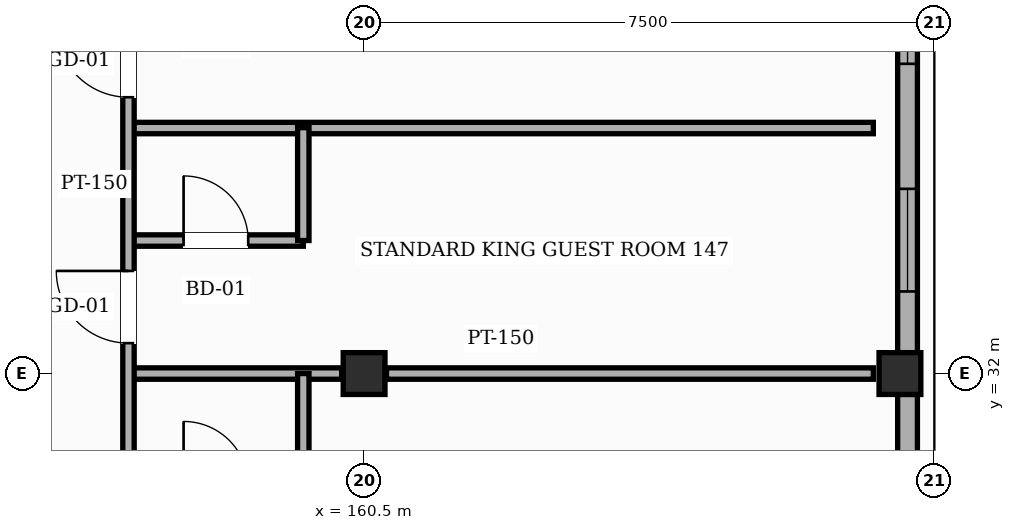
"""IFC4 building model, lengths in metres.
Left out: names, types, materials, properties, quantities, classifications, styles, units other than length and angle.
Written with IfcOpenShell. Run it as: python <this file> out.ifc"""

import sys

from ifc_helpers import new_model, si_unit, direction, frame, frame_2d, origin, origin_2d, place, context, subcontext, project, spatial, rectangle, hollow_rectangle, extrude, element, fill, save


model = new_model("IFC4")
c1 = context("Model", 3, precision=1e-05, world=origin(), true_north=direction((0.0, 1.0)))
c2 = subcontext(c1, "Body", "Model", "MODEL_VIEW")
j1 = project(units=[si_unit("LENGTHUNIT", "METRE"), si_unit("PLANEANGLEUNIT", "RADIAN")], contexts=[c1])
p1 = place(None, origin())
s1 = spatial("IfcSite", under=j1, at=p1, CompositionType="ELEMENT")
p2 = place(p1, origin())
s2 = spatial("IfcBuilding", under=s1, at=p2, CompositionType="ELEMENT")
p3 = place(p2, frame((0.0, 0.0, 28.2)))
s3 = spatial("IfcBuildingStorey", under=s2, at=p3, CompositionType="ELEMENT", Elevation=28.2)
for number, where, z_axis, x_axis in (
    (1, (160.5, 32.0, 0.0), (0.0, 0.0, 1.0), (1.0, 0.0, 0.0)),
    (2, (167.55, 32.0, 0.0), (0.0, 0.0, 1.0), (1.0, 0.0, 0.0)),
):
    element("IfcColumn", number, at=place(p3, frame(where, z_axis=z_axis, x_axis=x_axis)), inside=s3, PredefinedType="COLUMN", context=c2, shape_type="SweptSolid", body=[
        extrude(hollow_rectangle(XDim=0.55, YDim=0.55, WallThickness=0.022, InnerFilletRadius=0.022, OuterFilletRadius=0.044, at=origin_2d()), origin(), (0.0, 0.0, 1.0), 3.6),
    ])
p4 = place(p3, frame((167.65, 31.725, 0.0), z_axis=(0.0, 0.0, 1.0), x_axis=(0.0, -1.0, 0.0)))
e3 = element("IfcWall", 3, at=p4, inside=s3, PredefinedType="SOLIDWALL", context=c2, shape_type="SweptSolid", body=[
    extrude(rectangle(XDim=7.45, YDim=0.26, at=frame_2d((3.725, 0.0))), origin(), (0.0, 0.0, 1.0), 2.755),
])
p5 = place(p4, frame((3.525, 0.0, 0.85)))
e4 = element("IfcOpeningElement", 4, at=p5, cuts=e3, PredefinedType="OPENING", context=c2, shape_type="SweptSolid", body=[
    extrude(rectangle(XDim=2.1, YDim=1.35, at=frame_2d((1.05, 0.675))), frame((0.0, 0.14, 0.0), z_axis=(0.0, -1.0, 0.0), x_axis=(1.0, 0.0, 0.0)), (0.0, 0.0, 1.0), 0.28),
])
p6 = place(p4, frame((0.905, 0.0, 0.85)))
e5 = element("IfcOpeningElement", 5, at=p6, cuts=e3, PredefinedType="OPENING", context=c2, shape_type="SweptSolid", body=[
    extrude(rectangle(XDim=1.15, YDim=1.5, at=frame_2d((0.575, 0.75))), frame((0.0, 0.14, 0.0), z_axis=(0.0, -1.0, 0.0), x_axis=(1.0, 0.0, 0.0)), (0.0, 0.0, 1.0), 0.28),
])
p7 = place(p3, frame((167.65, 40.625, 0.0), z_axis=(0.0, 0.0, 1.0), x_axis=(0.0, -1.0, 0.0)))
e6 = element("IfcWall", 6, at=p7, inside=s3, PredefinedType="SOLIDWALL", context=c2, shape_type="SweptSolid", body=[
    extrude(rectangle(XDim=8.35, YDim=0.26, at=frame_2d((4.175, 0.0))), origin(), (0.0, 0.0, 1.0), 2.755),
])
p8 = place(p7, frame((6.195, 0.0, 0.85)))
e7 = element("IfcOpeningElement", 7, at=p8, cuts=e6, PredefinedType="OPENING", context=c2, shape_type="SweptSolid", body=[
    extrude(rectangle(XDim=1.35, YDim=1.5, at=frame_2d((0.675, 0.75))), frame((0.0, 0.14, 0.0), z_axis=(0.0, -1.0, 0.0), x_axis=(1.0, 0.0, 0.0)), (0.0, 0.0, 1.0), 0.28),
])
p9 = place(p7, frame((3.0, 0.0, 0.85)))
e8 = element("IfcOpeningElement", 8, at=p9, cuts=e6, PredefinedType="OPENING", context=c2, shape_type="SweptSolid", body=[
    extrude(rectangle(XDim=1.55, YDim=1.5, at=frame_2d((0.775, 0.75))), frame((0.0, 0.14, 0.0), z_axis=(0.0, -1.0, 0.0), x_axis=(1.0, 0.0, 0.0)), (0.0, 0.0, 1.0), 0.28),
])
p10 = place(p7, frame((0.205, 0.0, 0.85)))
e9 = element("IfcOpeningElement", 9, at=p10, cuts=e6, PredefinedType="OPENING", context=c2, shape_type="SweptSolid", body=[
    extrude(rectangle(XDim=1.75, YDim=1.5, at=frame_2d((0.875, 0.75))), frame((0.0, 0.14, 0.0), z_axis=(0.0, -1.0, 0.0), x_axis=(1.0, 0.0, 0.0)), (0.0, 0.0, 1.0), 0.28),
])
p11 = place(p3, frame((157.4, 32.0, 0.0), z_axis=(0.0, 0.0, 1.0), x_axis=(1.0, 0.0, 0.0)))
e10 = element("IfcWall", 10, at=p11, inside=s3, PredefinedType="PARTITIONING", context=c2, shape_type="SweptSolid", body=[
    extrude(rectangle(XDim=2.805, YDim=0.15, at=frame_2d((1.403, 0.0))), origin(), (0.0, 0.0, 1.0), 2.805),
])
p12 = place(p3, frame((160.795, 32.0, 0.0), z_axis=(0.0, 0.0, 1.0), x_axis=(1.0, 0.0, 0.0)))
e11 = element("IfcWall", 11, at=p12, inside=s3, PredefinedType="PARTITIONING", context=c2, shape_type="SweptSolid", body=[
    extrude(rectangle(XDim=6.405, YDim=0.15, at=frame_2d((3.203, 0.0))), origin(), (0.0, 0.0, 1.0), 2.855),
])
p13 = place(p3, frame((157.4, 33.75, 0.0), z_axis=(0.0, 0.0, 1.0), x_axis=(1.0, 0.0, 0.0)))
e12 = element("IfcWall", 12, at=p13, inside=s3, PredefinedType="PARTITIONING", context=c2, shape_type="SweptSolid", body=[
    extrude(rectangle(XDim=2.3, YDim=0.15, at=frame_2d((1.15, 0.0))), origin(), (0.0, 0.0, 1.0), 3.365),
])
p14 = place(p13, frame((0.725, 0.0, 0.0)))
e13 = element("IfcOpeningElement", 13, at=p14, cuts=e12, PredefinedType="OPENING", context=c2, shape_type="SweptSolid", body=[
    extrude(rectangle(XDim=0.85, YDim=2.1, at=frame_2d((0.425, 1.05))), frame((0.0, 0.085, 0.0), z_axis=(0.0, -1.0, 0.0), x_axis=(1.0, 0.0, 0.0)), (0.0, 0.0, 1.0), 0.17),
])
p15 = place(p3, frame((157.4, 35.23, 0.0), z_axis=(0.0, 0.0, 1.0), x_axis=(1.0, 0.0, 0.0)))
e14 = element("IfcWall", 14, at=p15, inside=s3, PredefinedType="PARTITIONING", context=c2, shape_type="SweptSolid", body=[
    extrude(rectangle(XDim=9.8, YDim=0.15, at=frame_2d((4.9, 0.0))), origin(), (0.0, 0.0, 1.0), 3.365),
])
p16 = place(p3, frame((157.4, 22.3, 0.0), z_axis=(0.0, 0.0, 1.0), x_axis=(0.0, 1.0, 0.0)))
e15 = element("IfcWall", 15, at=p16, inside=s3, PredefinedType="PARTITIONING", context=c2, shape_type="SweptSolid", body=[
    extrude(rectangle(XDim=48.5, YDim=0.15, at=frame_2d((24.25, 0.0))), origin(), (0.0, 0.0, 1.0), 3.365),
])
p17 = place(p16, frame((0.325, 0.0, 0.0)))
e16 = element("IfcOpeningElement", 16, at=p17, cuts=e15, PredefinedType="OPENING", context=c2, shape_type="SweptSolid", body=[
    extrude(rectangle(XDim=1.1, YDim=2.2, at=frame_2d((0.55, 1.1))), frame((0.0, 0.085, 0.0), z_axis=(0.0, -1.0, 0.0), x_axis=(1.0, 0.0, 0.0)), (0.0, 0.0, 1.0), 0.17),
])
p18 = place(p16, frame((3.635, 0.0, 0.0)))
e17 = element("IfcOpeningElement", 17, at=p18, cuts=e15, PredefinedType="OPENING", context=c2, shape_type="SweptSolid", body=[
    extrude(rectangle(XDim=0.95, YDim=2.15, at=frame_2d((0.475, 1.075))), frame((0.0, 0.085, 0.0), z_axis=(0.0, -1.0, 0.0), x_axis=(1.0, 0.0, 0.0)), (0.0, 0.0, 1.0), 0.17),
])
p19 = place(p16, frame((6.865, 0.0, 0.0)))
e18 = element("IfcOpeningElement", 18, at=p19, cuts=e15, PredefinedType="OPENING", context=c2, shape_type="SweptSolid", body=[
    extrude(rectangle(XDim=0.95, YDim=2.15, at=frame_2d((0.475, 1.075))), frame((0.0, 0.085, 0.0), z_axis=(0.0, -1.0, 0.0), x_axis=(1.0, 0.0, 0.0)), (0.0, 0.0, 1.0), 0.17),
])
p20 = place(p16, frame((10.1, 0.0, 0.0)))
e19 = element("IfcOpeningElement", 19, at=p20, cuts=e15, PredefinedType="OPENING", context=c2, shape_type="SweptSolid", body=[
    extrude(rectangle(XDim=0.95, YDim=2.15, at=frame_2d((0.475, 1.075))), frame((0.0, 0.085, 0.0), z_axis=(0.0, -1.0, 0.0), x_axis=(1.0, 0.0, 0.0)), (0.0, 0.0, 1.0), 0.17),
])
p21 = place(p16, frame((13.335, 0.0, 0.0)))
e20 = element("IfcOpeningElement", 20, at=p21, cuts=e15, PredefinedType="OPENING", context=c2, shape_type="SweptSolid", body=[
    extrude(rectangle(XDim=0.95, YDim=2.15, at=frame_2d((0.475, 1.075))), frame((0.0, 0.085, 0.0), z_axis=(0.0, -1.0, 0.0), x_axis=(1.0, 0.0, 0.0)), (0.0, 0.0, 1.0), 0.17),
])
p22 = place(p16, frame((16.565, 0.0, 0.0)))
e21 = element("IfcOpeningElement", 21, at=p22, cuts=e15, PredefinedType="OPENING", context=c2, shape_type="SweptSolid", body=[
    extrude(rectangle(XDim=0.95, YDim=2.15, at=frame_2d((0.475, 1.075))), frame((0.0, 0.085, 0.0), z_axis=(0.0, -1.0, 0.0), x_axis=(1.0, 0.0, 0.0)), (0.0, 0.0, 1.0), 0.17),
])
p23 = place(p16, frame((19.8, 0.0, 0.0)))
e22 = element("IfcOpeningElement", 22, at=p23, cuts=e15, PredefinedType="OPENING", context=c2, shape_type="SweptSolid", body=[
    extrude(rectangle(XDim=0.95, YDim=2.15, at=frame_2d((0.475, 1.075))), frame((0.0, 0.085, 0.0), z_axis=(0.0, -1.0, 0.0), x_axis=(1.0, 0.0, 0.0)), (0.0, 0.0, 1.0), 0.17),
])
p24 = place(p16, frame((23.035, 0.0, 0.0)))
e23 = element("IfcOpeningElement", 23, at=p24, cuts=e15, PredefinedType="OPENING", context=c2, shape_type="SweptSolid", body=[
    extrude(rectangle(XDim=0.95, YDim=2.15, at=frame_2d((0.475, 1.075))), frame((0.0, 0.085, 0.0), z_axis=(0.0, -1.0, 0.0), x_axis=(1.0, 0.0, 0.0)), (0.0, 0.0, 1.0), 0.17),
])
p25 = place(p16, frame((26.265, 0.0, 0.0)))
e24 = element("IfcOpeningElement", 24, at=p25, cuts=e15, PredefinedType="OPENING", context=c2, shape_type="SweptSolid", body=[
    extrude(rectangle(XDim=0.95, YDim=2.15, at=frame_2d((0.475, 1.075))), frame((0.0, 0.085, 0.0), z_axis=(0.0, -1.0, 0.0), x_axis=(1.0, 0.0, 0.0)), (0.0, 0.0, 1.0), 0.17),
])
p26 = place(p16, frame((29.5, 0.0, 0.0)))
e25 = element("IfcOpeningElement", 25, at=p26, cuts=e15, PredefinedType="OPENING", context=c2, shape_type="SweptSolid", body=[
    extrude(rectangle(XDim=0.95, YDim=2.15, at=frame_2d((0.475, 1.075))), frame((0.0, 0.085, 0.0), z_axis=(0.0, -1.0, 0.0), x_axis=(1.0, 0.0, 0.0)), (0.0, 0.0, 1.0), 0.17),
])
p27 = place(p16, frame((32.735, 0.0, 0.0)))
e26 = element("IfcOpeningElement", 26, at=p27, cuts=e15, PredefinedType="OPENING", context=c2, shape_type="SweptSolid", body=[
    extrude(rectangle(XDim=0.95, YDim=2.15, at=frame_2d((0.475, 1.075))), frame((0.0, 0.085, 0.0), z_axis=(0.0, -1.0, 0.0), x_axis=(1.0, 0.0, 0.0)), (0.0, 0.0, 1.0), 0.17),
])
p28 = place(p16, frame((35.965, 0.0, 0.0)))
e27 = element("IfcOpeningElement", 27, at=p28, cuts=e15, PredefinedType="OPENING", context=c2, shape_type="SweptSolid", body=[
    extrude(rectangle(XDim=0.95, YDim=2.15, at=frame_2d((0.475, 1.075))), frame((0.0, 0.085, 0.0), z_axis=(0.0, -1.0, 0.0), x_axis=(1.0, 0.0, 0.0)), (0.0, 0.0, 1.0), 0.17),
])
p29 = place(p16, frame((39.2, 0.0, 0.0)))
e28 = element("IfcOpeningElement", 28, at=p29, cuts=e15, PredefinedType="OPENING", context=c2, shape_type="SweptSolid", body=[
    extrude(rectangle(XDim=0.95, YDim=2.15, at=frame_2d((0.475, 1.075))), frame((0.0, 0.085, 0.0), z_axis=(0.0, -1.0, 0.0), x_axis=(1.0, 0.0, 0.0)), (0.0, 0.0, 1.0), 0.17),
])
p30 = place(p16, frame((42.435, 0.0, 0.0)))
e29 = element("IfcOpeningElement", 29, at=p30, cuts=e15, PredefinedType="OPENING", context=c2, shape_type="SweptSolid", body=[
    extrude(rectangle(XDim=0.95, YDim=2.15, at=frame_2d((0.475, 1.075))), frame((0.0, 0.085, 0.0), z_axis=(0.0, -1.0, 0.0), x_axis=(1.0, 0.0, 0.0)), (0.0, 0.0, 1.0), 0.17),
])
p31 = place(p16, frame((45.665, 0.0, 0.0)))
e30 = element("IfcOpeningElement", 30, at=p31, cuts=e15, PredefinedType="OPENING", context=c2, shape_type="SweptSolid", body=[
    extrude(rectangle(XDim=0.95, YDim=2.15, at=frame_2d((0.475, 1.075))), frame((0.0, 0.085, 0.0), z_axis=(0.0, -1.0, 0.0), x_axis=(1.0, 0.0, 0.0)), (0.0, 0.0, 1.0), 0.17),
])
for number, where, z_axis, x_axis in (
    (31, (159.7, 30.515, 0.0), (0.0, 0.0, 1.0), (0.0, 1.0, 0.0)),
    (32, (159.7, 33.75, 0.0), (0.0, 0.0, 1.0), (0.0, 1.0, 0.0)),
):
    element("IfcWall", number, at=place(p3, frame(where, z_axis=z_axis, x_axis=x_axis)), inside=s3, PredefinedType="PARTITIONING", context=c2, shape_type="SweptSolid", body=[
        extrude(rectangle(XDim=1.485, YDim=0.15, at=frame_2d((0.743, 0.0))), origin(), (0.0, 0.0, 1.0), 3.365),
    ])
p32 = place(p8, origin())
e33 = element("IfcWindow", 33, at=p32, inside=s3, PartitioningType="SINGLE_PANEL", PredefinedType="WINDOW", context=c2, shape_type="SweptSolid", body=[
    extrude(rectangle(XDim=1.35, YDim=1.5, at=frame_2d((0.675, 0.75))), frame((0.0, 0.03, 0.0), z_axis=(0.0, -1.0, 0.0), x_axis=(1.0, 0.0, 0.0)), (0.0, 0.0, 1.0), 0.06),
])
fill(e7, e33)
p33 = place(p9, origin())
e34 = element("IfcWindow", 34, at=p33, inside=s3, PartitioningType="SINGLE_PANEL", PredefinedType="WINDOW", context=c2, shape_type="SweptSolid", body=[
    extrude(rectangle(XDim=1.55, YDim=1.5, at=frame_2d((0.775, 0.75))), frame((0.0, 0.03, 0.0), z_axis=(0.0, -1.0, 0.0), x_axis=(1.0, 0.0, 0.0)), (0.0, 0.0, 1.0), 0.06),
])
fill(e8, e34)
p34 = place(p20, origin())
e35 = element("IfcDoor", 35, at=p34, inside=s3, OperationType="SINGLE_SWING_RIGHT", PredefinedType="DOOR", context=c2, shape_type="SweptSolid", body=[
    extrude(rectangle(XDim=0.95, YDim=2.15, at=frame_2d((0.475, 1.075))), frame((0.0, 0.025, 0.0), z_axis=(0.0, -1.0, 0.0), x_axis=(1.0, 0.0, 0.0)), (0.0, 0.0, 1.0), 0.05),
])
fill(e19, e35)
p35 = place(p14, origin())
e36 = element("IfcDoor", 36, at=p35, inside=s3, OperationType="SINGLE_SWING_LEFT", PredefinedType="DOOR", context=c2, shape_type="SweptSolid", body=[
    extrude(rectangle(XDim=0.85, YDim=2.1, at=frame_2d((0.425, 1.05))), frame((0.0, 0.025, 0.0), z_axis=(0.0, -1.0, 0.0), x_axis=(1.0, 0.0, 0.0)), (0.0, 0.0, 1.0), 0.05),
])
fill(e13, e36)
p36 = place(p21, origin())
e37 = element("IfcDoor", 37, at=p36, inside=s3, OperationType="SINGLE_SWING_RIGHT", PredefinedType="DOOR", context=c2, shape_type="SweptSolid", body=[
    extrude(rectangle(XDim=0.95, YDim=2.15, at=frame_2d((0.475, 1.075))), frame((0.0, 0.025, 0.0), z_axis=(0.0, -1.0, 0.0), x_axis=(1.0, 0.0, 0.0)), (0.0, 0.0, 1.0), 0.05),
])
fill(e20, e37)
save(model, sys.argv[1])
